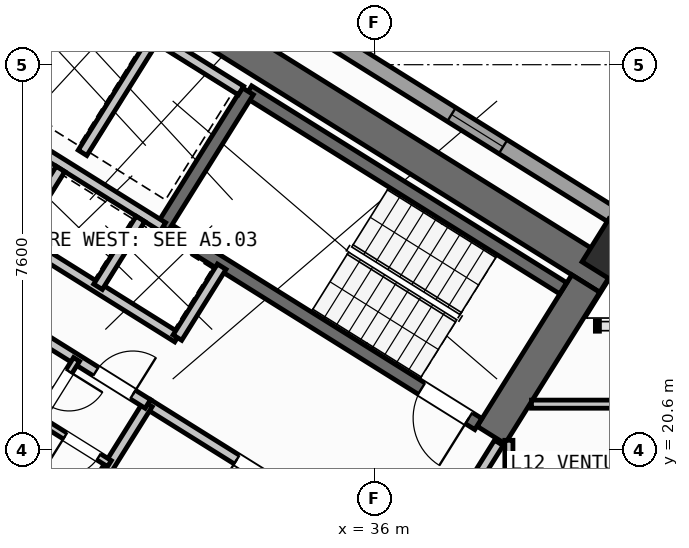
"""IFC4 building model, lengths in metres.
Left out: names, types, materials, properties, quantities, classifications, styles, units other than length and angle.
Written with IfcOpenShell. Run it as: python <this file> out.ifc"""

import sys

from ifc_helpers import new_model, si_unit, direction, frame, frame_2d, origin, origin_2d, place, context, subcontext, project, spatial, rectangle, hollow_rectangle, extrude, source, transform, mapped, element, fill, save


model = new_model("IFC4")
c1 = context("Model", 3, precision=1e-05, world=origin(), true_north=direction((0.0, 1.0)))
c2 = subcontext(c1, "Body", "Model", "MODEL_VIEW")
j1 = project(units=[si_unit("LENGTHUNIT", "METRE"), si_unit("PLANEANGLEUNIT", "RADIAN")], contexts=[c1])
p1 = place(None, origin())
s1 = spatial("IfcSite", under=j1, at=p1, CompositionType="ELEMENT")
p2 = place(p1, origin())
s2 = spatial("IfcBuilding", under=s1, at=p2, CompositionType="ELEMENT")
p3 = place(p2, frame((0.0, 0.0, 49.2)))
s3 = spatial("IfcBuildingStorey", under=s2, at=p3, CompositionType="ELEMENT", Elevation=49.2)
p4 = place(p3, frame((40.615, 23.983, 0.0), z_axis=(0.0, 0.0, 1.0), x_axis=(-0.848045953968, 0.529922692436, 0.0)))
e1 = element("IfcWall", 1, at=p4, inside=s3, PredefinedType="SHEAR", context=c2, shape_type="SweptSolid", body=[
    extrude(rectangle(XDim=13.24, YDim=0.65, at=frame_2d((6.62, 0.0))), origin(), (0.0, 0.0, 1.0), 3.35),
])
for number, where, z_axis, x_axis in (
    (2, (40.168, 23.88, 0.0), (0.0, 0.0, 1.0), (-0.53, -0.848, 0.0)),
    (3, (29.491, 30.552, 0.0), (0.0, 0.0, 1.0), (-0.53, -0.848, 0.0)),
):
    element("IfcWall", number, at=place(p3, frame(where, z_axis=z_axis, x_axis=x_axis)), inside=s3, PredefinedType="SHEAR", context=c2, shape_type="SweptSolid", body=[
        extrude(rectangle(XDim=3.525, YDim=0.65, at=frame_2d((1.763, 0.0))), origin(), (0.0, 0.0, 1.0), 3.35),
    ])
m1 = source(origin(), c2, "Body", "SweptSolid", [
    extrude(hollow_rectangle(XDim=1.0, YDim=1.0, WallThickness=0.04, at=origin_2d()), origin(), (0.0, 0.0, 1.0), 3.6),
])
p5 = place(p3, frame((40.783, 24.469, 0.0), z_axis=(0.0, 0.0, 1.0), x_axis=(-0.848048096156, 0.529919264233, 0.0)))
e4 = element("IfcColumn", 4, at=p5, inside=s3, PredefinedType="COLUMN", context=c2, shape_type="MappedRepresentation", body=[
    mapped(m1, transform((0.0, 0.0, 0.0), scale=1.0)),
])
p6 = place(p3, frame((14.138, 41.825, 0.0), z_axis=(0.0, 0.0, 1.0), x_axis=(0.848046498049, -0.529921821731, 0.0)))
e5 = element("IfcWall", 5, at=p6, inside=s3, PredefinedType="STANDARD", context=c2, shape_type="SweptSolid", body=[
    extrude(rectangle(XDim=31.588, YDim=0.32, at=frame_2d((15.794, 0.0))), origin(), (0.0, 0.0, 1.0), 3.35),
])
p7 = place(p6, frame((3.159, 0.0, 0.0)))
e6 = element("IfcOpeningElement", 6, at=p7, cuts=e5, PredefinedType="OPENING", context=c2, shape_type="SweptSolid", body=[
    extrude(rectangle(XDim=1.05, YDim=2.15, at=frame_2d((0.525, 1.075))), frame((0.0, 0.17, 0.0), z_axis=(0.0, -1.0, 0.0), x_axis=(1.0, 0.0, 0.0)), (0.0, 0.0, 1.0), 0.34),
])
p8 = place(p6, frame((0.906, 0.0, 1.0)))
e7 = element("IfcOpeningElement", 7, at=p8, cuts=e5, PredefinedType="OPENING", context=c2, shape_type="SweptSolid", body=[
    extrude(rectangle(XDim=0.9, YDim=1.25, at=frame_2d((0.45, 0.625))), frame((0.0, 0.17, 0.0), z_axis=(0.0, -1.0, 0.0), x_axis=(1.0, 0.0, 0.0)), (0.0, 0.0, 1.0), 0.34),
])
p9 = place(p6, frame((9.537, 0.0, 0.85)))
e8 = element("IfcOpeningElement", 8, at=p9, cuts=e5, PredefinedType="OPENING", context=c2, shape_type="SweptSolid", body=[
    extrude(rectangle(XDim=1.8, YDim=1.5, at=frame_2d((0.9, 0.75))), frame((0.0, 0.17, 0.0), z_axis=(0.0, -1.0, 0.0), x_axis=(1.0, 0.0, 0.0)), (0.0, 0.0, 1.0), 0.34),
])
p10 = place(p6, frame((13.899, 0.0, 0.85)))
e9 = element("IfcOpeningElement", 9, at=p10, cuts=e5, PredefinedType="OPENING", context=c2, shape_type="SweptSolid", body=[
    extrude(rectangle(XDim=1.5, YDim=1.5, at=frame_2d((0.75, 0.75))), frame((0.0, 0.17, 0.0), z_axis=(0.0, -1.0, 0.0), x_axis=(1.0, 0.0, 0.0)), (0.0, 0.0, 1.0), 0.34),
])
p11 = place(p6, frame((22.019, 0.0, 0.95)))
e10 = element("IfcOpeningElement", 10, at=p11, cuts=e5, PredefinedType="OPENING", context=c2, shape_type="SweptSolid", body=[
    extrude(rectangle(XDim=1.2, YDim=1.4, at=frame_2d((0.6, 0.7))), frame((0.0, 0.17, 0.0), z_axis=(0.0, -1.0, 0.0), x_axis=(1.0, 0.0, 0.0)), (0.0, 0.0, 1.0), 0.34),
])
p12 = place(p6, frame((27.569, 0.0, 0.95)))
e11 = element("IfcOpeningElement", 11, at=p12, cuts=e5, PredefinedType="OPENING", context=c2, shape_type="SweptSolid", body=[
    extrude(rectangle(XDim=1.2, YDim=1.4, at=frame_2d((0.6, 0.7))), frame((0.0, 0.17, 0.0), z_axis=(0.0, -1.0, 0.0), x_axis=(1.0, 0.0, 0.0)), (0.0, 0.0, 1.0), 0.34),
])
p13 = place(p3, frame((31.28, 18.261, 0.0), z_axis=(0.0, 0.0, 1.0), x_axis=(-0.848051618787, 0.529913626805, 0.0)))
e12 = element("IfcWall", 12, at=p13, inside=s3, PredefinedType="SHEAR", context=c2, shape_type="SweptSolid", body=[
    extrude(rectangle(XDim=7.46, YDim=0.26, at=frame_2d((3.73, 0.0))), origin(), (0.0, 0.0, 1.0), 3.35),
])
p14 = place(p13, frame((0.36, 0.0, 0.0)))
e13 = element("IfcOpeningElement", 13, at=p14, cuts=e12, PredefinedType="OPENING", context=c2, shape_type="SweptSolid", body=[
    extrude(rectangle(XDim=0.86, YDim=2.05, at=frame_2d((0.43, 1.025))), frame((0.0, 0.14, 0.0), z_axis=(0.0, -1.0, 0.0), x_axis=(1.0, 0.0, 0.0)), (0.0, 0.0, 1.0), 0.28),
])
p15 = place(p3, frame((39.721, 23.788, 0.0), z_axis=(0.0, 0.0, 1.0), x_axis=(-0.848054434086, 0.529909121291, 0.0)))
e14 = element("IfcWall", 14, at=p15, inside=s3, PredefinedType="SHEAR", context=c2, shape_type="SweptSolid", body=[
    extrude(rectangle(XDim=7.33, YDim=0.26, at=frame_2d((3.665, 0.0))), origin(), (0.0, 0.0, 1.0), 3.35),
])
p16 = place(p3, frame((38.046, 21.108, 0.0), z_axis=(0.0, 0.0, 1.0), x_axis=(-0.848054434086, 0.529909121291, 0.0)))
e15 = element("IfcWall", 15, at=p16, inside=s3, PredefinedType="SHEAR", context=c2, shape_type="SweptSolid", body=[
    extrude(rectangle(XDim=7.33, YDim=0.26, at=frame_2d((3.665, 0.0))), origin(), (0.0, 0.0, 1.0), 3.35),
])
p17 = place(p16, frame((0.22, 0.0, 0.0)))
e16 = element("IfcOpeningElement", 16, at=p17, cuts=e15, PredefinedType="OPENING", context=c2, shape_type="SweptSolid", body=[
    extrude(rectangle(XDim=1.1, YDim=2.1, at=frame_2d((0.55, 1.05))), frame((0.0, 0.14, 0.0), z_axis=(0.0, -1.0, 0.0), x_axis=(1.0, 0.0, 0.0)), (0.0, 0.0, 1.0), 0.28),
])
p18 = place(p3, frame((33.496, 27.677, 0.0), z_axis=(0.0, 0.0, 1.0), x_axis=(-0.529908658664, -0.84805472316, 0.0)))
e17 = element("IfcWall", 17, at=p18, inside=s3, PredefinedType="SHEAR", context=c2, shape_type="SweptSolid", body=[
    extrude(rectangle(XDim=3.16, YDim=0.26, at=frame_2d((1.58, 0.0))), origin(), (0.0, 0.0, 1.0), 3.35),
])
p19 = place(p3, frame((36.374, 18.474, 0.0), z_axis=(0.0, 0.0, 1.0), x_axis=(-0.848051071577, 0.529914502535, 0.0)))
e18 = element("IfcWall", 18, at=p19, inside=s3, PredefinedType="STANDARD", context=c2, shape_type="SweptSolid", body=[
    extrude(rectangle(XDim=5.718, YDim=0.2, at=frame_2d((2.859, 0.0))), origin(), (0.0, 0.0, 1.0), 3.34),
])
p20 = place(p19, frame((2.498, 0.0, 0.0)))
e19 = element("IfcOpeningElement", 19, at=p20, cuts=e18, PredefinedType="OPENING", context=c2, shape_type="SweptSolid", body=[
    extrude(rectangle(XDim=1.15, YDim=2.1, at=frame_2d((0.575, 1.05))), frame((0.0, 0.11, 0.0), z_axis=(0.0, -1.0, 0.0), x_axis=(1.0, 0.0, 0.0)), (0.0, 0.0, 1.0), 0.22),
])
p21 = place(p3, frame((31.822, 24.998, 0.0), z_axis=(0.0, 0.0, 1.0), x_axis=(-0.848058348634, 0.529902856485, 0.0)))
e20 = element("IfcWall", 20, at=p21, inside=s3, PredefinedType="STANDARD", context=c2, shape_type="SweptSolid", body=[
    extrude(rectangle(XDim=4.568, YDim=0.2, at=frame_2d((2.284, 0.0))), origin(), (0.0, 0.0, 1.0), 3.34),
])
p22 = place(p3, frame((32.108, 22.814, 0.0), z_axis=(0.0, 0.0, 1.0), x_axis=(-0.848042229521, 0.529928652696, 0.0)))
e21 = element("IfcWall", 21, at=p22, inside=s3, PredefinedType="STANDARD", context=c2, shape_type="SweptSolid", body=[
    extrude(rectangle(XDim=5.62, YDim=0.2, at=frame_2d((2.81, 0.0))), origin(), (0.0, 0.0, 1.0), 3.34),
])
p23 = place(p3, frame((32.982, 24.213, 0.0), z_axis=(0.0, 0.0, 1.0), x_axis=(-0.529839334948, -0.84809803628, 0.0)))
e22 = element("IfcWall", 22, at=p23, inside=s3, PredefinedType="STANDARD", context=c2, shape_type="SweptSolid", body=[
    extrude(rectangle(XDim=1.65, YDim=0.2, at=frame_2d((0.825, 0.0))), origin(), (0.0, 0.0, 1.0), 3.34),
])
p24 = place(p3, frame((31.645, 28.716, 0.0), z_axis=(0.0, 0.0, 1.0), x_axis=(-0.52986693015, -0.848080795876, 0.0)))
e23 = element("IfcWall", 23, at=p24, inside=s3, PredefinedType="STANDARD", context=c2, shape_type="SweptSolid", body=[
    extrude(rectangle(XDim=2.66, YDim=0.2, at=frame_2d((1.33, 0.0))), origin(), (0.0, 0.0, 1.0), 3.34),
])
p25 = place(p3, frame((33.363, 27.69, 0.0), z_axis=(0.0, 0.0, 1.0), x_axis=(-0.848053806312, 0.529910125964, 0.0)))
e24 = element("IfcWall", 24, at=p25, inside=s3, PredefinedType="STANDARD", context=c2, shape_type="SweptSolid", body=[
    extrude(rectangle(XDim=4.448, YDim=0.2, at=frame_2d((2.224, 0.0))), origin(), (0.0, 0.0, 1.0), 3.34),
])
for number, where, z_axis, x_axis in (
    (25, (31.379, 25.156, 0.0), (0.0, 0.0, 1.0), (-0.53, -0.848, 0.0)),
    (26, (29.801, 26.142, 0.0), (0.0, 0.0, 1.0), (-0.53, -0.848, 0.0)),
):
    element("IfcWall", number, at=place(p3, frame(where, z_axis=z_axis, x_axis=x_axis)), inside=s3, PredefinedType="STANDARD", context=c2, shape_type="SweptSolid", body=[
        extrude(rectangle(XDim=1.58, YDim=0.2, at=frame_2d((0.79, 0.0))), origin(), (0.0, 0.0, 1.0), 3.34),
    ])
p26 = place(p3, frame((31.525, 21.504, 0.0), z_axis=(0.0, 0.0, 1.0), x_axis=(-0.529907497854, -0.848055448493, 0.0)))
e27 = element("IfcWall", 27, at=p26, inside=s3, PredefinedType="STANDARD", context=c2, shape_type="SweptSolid", body=[
    extrude(rectangle(XDim=2.88, YDim=0.2, at=frame_2d((1.44, 0.0))), origin(), (0.0, 0.0, 1.0), 3.34),
])
p27 = place(p3, frame((31.525, 21.504, 0.0), z_axis=(0.0, 0.0, 1.0), x_axis=(-0.848044998614, 0.529924221305, 0.0)))
e28 = element("IfcWall", 28, at=p27, inside=s3, PredefinedType="STANDARD", context=c2, shape_type="SweptSolid", body=[
    extrude(rectangle(XDim=6.168, YDim=0.2, at=frame_2d((3.084, 0.0))), origin(), (0.0, 0.0, 1.0), 3.34),
])
p28 = place(p27, frame((4.4, 0.0, 0.0)))
e29 = element("IfcOpeningElement", 29, at=p28, cuts=e28, PredefinedType="OPENING", context=c2, shape_type="SweptSolid", body=[
    extrude(rectangle(XDim=0.86, YDim=2.05, at=frame_2d((0.43, 1.025))), frame((0.0, 0.11, 0.0), z_axis=(0.0, -1.0, 0.0), x_axis=(1.0, 0.0, 0.0)), (0.0, 0.0, 1.0), 0.22),
])
p29 = place(p27, frame((0.35, 0.0, 0.0)))
e30 = element("IfcOpeningElement", 30, at=p29, cuts=e28, PredefinedType="OPENING", context=c2, shape_type="SweptSolid", body=[
    extrude(rectangle(XDim=0.86, YDim=2.05, at=frame_2d((0.43, 1.025))), frame((0.0, 0.11, 0.0), z_axis=(0.0, -1.0, 0.0), x_axis=(1.0, 0.0, 0.0)), (0.0, 0.0, 1.0), 0.22),
])
p30 = place(p3, frame((30.117, 22.384, 0.0), z_axis=(0.0, 0.0, 1.0), x_axis=(-0.529951914384, -0.848027693204, 0.0)))
e31 = element("IfcWall", 31, at=p30, inside=s3, PredefinedType="PLUMBINGWALL", context=c2, shape_type="SweptSolid", body=[
    extrude(rectangle(XDim=1.4, YDim=0.14, at=frame_2d((0.7, 0.0))), origin(), (0.0, 0.0, 1.0), 3.34),
])
p31 = place(p30, frame((0.28, 0.0, 0.0)))
e32 = element("IfcOpeningElement", 32, at=p31, cuts=e31, PredefinedType="OPENING", context=c2, shape_type="SweptSolid", body=[
    extrude(rectangle(XDim=0.78, YDim=2.05, at=frame_2d((0.39, 1.025))), frame((0.0, 0.08, 0.0), z_axis=(0.0, -1.0, 0.0), x_axis=(1.0, 0.0, 0.0)), (0.0, 0.0, 1.0), 0.16),
])
p32 = place(p3, frame((30.766, 20.327, 0.0), z_axis=(0.0, 0.0, 1.0), x_axis=(-0.848052663127, 0.529911955482, 0.0)))
e33 = element("IfcWall", 33, at=p32, inside=s3, PredefinedType="PLUMBINGWALL", context=c2, shape_type="SweptSolid", body=[
    extrude(rectangle(XDim=3.28, YDim=0.14, at=frame_2d((1.64, 0.0))), origin(), (0.0, 0.0, 1.0), 3.34),
])
p33 = place(p32, frame((0.25, 0.0, 0.0)))
e34 = element("IfcOpeningElement", 34, at=p33, cuts=e33, PredefinedType="OPENING", context=c2, shape_type="SweptSolid", body=[
    extrude(rectangle(XDim=0.78, YDim=2.05, at=frame_2d((0.39, 1.025))), frame((0.0, 0.08, 0.0), z_axis=(0.0, -1.0, 0.0), x_axis=(1.0, 0.0, 0.0)), (0.0, 0.0, 1.0), 0.16),
])
p34 = place(p32, frame((1.92, 0.0, 0.0)))
e35 = element("IfcOpeningElement", 35, at=p34, cuts=e33, PredefinedType="OPENING", context=c2, shape_type="SweptSolid", body=[
    extrude(rectangle(XDim=0.78, YDim=2.05, at=frame_2d((0.39, 1.025))), frame((0.0, 0.08, 0.0), z_axis=(0.0, -1.0, 0.0), x_axis=(1.0, 0.0, 0.0)), (0.0, 0.0, 1.0), 0.16),
])
p35 = place(p3, frame((38.451, 20.737, 0.0), z_axis=(0.0, 0.0, 1.0), x_axis=(-0.529924799939, -0.848044637038, 0.0)))
e36 = element("IfcWall", 36, at=p35, inside=s3, PredefinedType="STANDARD", context=c2, shape_type="SweptSolid", body=[
    extrude(rectangle(XDim=2.96, YDim=0.2, at=frame_2d((1.48, 0.0))), origin(), (0.0, 0.0, 1.0), 3.34),
])
p36 = place(p35, frame((1.46, 0.0, 0.0)))
e37 = element("IfcOpeningElement", 37, at=p36, cuts=e36, PredefinedType="OPENING", context=c2, shape_type="SweptSolid", body=[
    extrude(rectangle(XDim=0.86, YDim=2.05, at=frame_2d((0.43, 1.025))), frame((0.0, 0.11, 0.0), z_axis=(0.0, -1.0, 0.0), x_axis=(1.0, 0.0, 0.0)), (0.0, 0.0, 1.0), 0.22),
])
p37 = place(p3, frame((38.65, 17.93, 0.0), z_axis=(0.0, 0.0, 1.0), x_axis=(0.0, 1.0, 0.0)))
e38 = element("IfcWall", 38, at=p37, inside=s3, PredefinedType="PARTITIONING", context=c2, shape_type="SweptSolid", body=[
    extrude(rectangle(XDim=2.857, YDim=0.16, at=frame_2d((1.428, 0.0))), origin(), (0.0, 0.0, 1.0), 3.34),
])
p38 = place(p3, frame((39.095, 21.5, 0.0), z_axis=(0.0, 0.0, 1.0), x_axis=(1.0, 0.0, 0.0)))
e39 = element("IfcWall", 39, at=p38, inside=s3, PredefinedType="PARTITIONING", context=c2, shape_type="SweptSolid", body=[
    extrude(rectangle(XDim=7.094, YDim=0.16, at=frame_2d((3.547, 0.0))), origin(), (0.0, 0.0, 1.0), 3.34),
])
m2 = source(origin(), c2, "Body", "SweptSolid", [
    extrude(rectangle(XDim=1.2, YDim=1.4, at=frame_2d((0.6, 0.7))), frame((0.0, 0.03, 0.0), z_axis=(0.0, -1.0, 0.0), x_axis=(1.0, 0.0, 0.0)), (0.0, 0.0, 1.0), 0.06),
])
p39 = place(p12, origin())
e40 = element("IfcWindow", 40, at=p39, inside=s3, PartitioningType="SINGLE_PANEL", PredefinedType="WINDOW", context=c2, shape_type="MappedRepresentation", body=[
    mapped(m2, transform((0.0, 0.0, 0.0), scale=1.0)),
])
fill(e11, e40)
m3 = source(origin(), c2, "Body", "SweptSolid", [
    extrude(rectangle(XDim=1.1, YDim=2.1, at=frame_2d((0.55, 1.05))), frame((0.0, 0.025, 0.0), z_axis=(0.0, -1.0, 0.0), x_axis=(1.0, 0.0, 0.0)), (0.0, 0.0, 1.0), 0.05),
])
p40 = place(p17, origin())
e41 = element("IfcDoor", 41, at=p40, inside=s3, OperationType="SINGLE_SWING_LEFT", PredefinedType="DOOR", context=c2, shape_type="MappedRepresentation", body=[
    mapped(m3, transform((0.0, 0.0, 0.0), scale=1.0)),
])
fill(e16, e41)
m4 = source(origin(), c2, "Body", "SweptSolid", [
    extrude(rectangle(XDim=1.15, YDim=2.1, at=frame_2d((0.575, 1.05))), frame((0.0, 0.025, 0.0), z_axis=(0.0, -1.0, 0.0), x_axis=(1.0, 0.0, 0.0)), (0.0, 0.0, 1.0), 0.05),
])
p41 = place(p20, origin())
e42 = element("IfcDoor", 42, at=p41, inside=s3, OperationType="SINGLE_SWING_RIGHT", PredefinedType="DOOR", context=c2, shape_type="MappedRepresentation", body=[
    mapped(m4, transform((0.0, 0.0, 0.0), scale=1.0)),
])
fill(e19, e42)
m5 = source(origin(), c2, "Body", "SweptSolid", [
    extrude(rectangle(XDim=0.86, YDim=2.05, at=frame_2d((0.43, 1.025))), frame((0.0, 0.025, 0.0), z_axis=(0.0, -1.0, 0.0), x_axis=(1.0, 0.0, 0.0)), (0.0, 0.0, 1.0), 0.05),
])
p42 = place(p29, frame((0.86, 0.0, 0.0), z_axis=(0.0, 0.0, 1.0), x_axis=(-1.0, 0.0, 0.0)))
e43 = element("IfcDoor", 43, at=p42, inside=s3, OperationType="SINGLE_SWING_RIGHT", PredefinedType="DOOR", context=c2, shape_type="MappedRepresentation", body=[
    mapped(m5, transform((0.0, 0.0, 0.0), scale=1.0)),
])
fill(e30, e43)
m6 = source(origin(), c2, "Body", "SweptSolid", [
    extrude(rectangle(XDim=0.78, YDim=2.05, at=frame_2d((0.39, 1.025))), frame((0.0, 0.025, 0.0), z_axis=(0.0, -1.0, 0.0), x_axis=(1.0, 0.0, 0.0)), (0.0, 0.0, 1.0), 0.05),
])
p43 = place(p31, origin())
e44 = element("IfcDoor", 44, at=p43, inside=s3, OperationType="SINGLE_SWING_LEFT", PredefinedType="DOOR", context=c2, shape_type="MappedRepresentation", body=[
    mapped(m6, transform((0.0, 0.0, 0.0), scale=1.0)),
])
fill(e32, e44)
p44 = place(p33, origin())
e45 = element("IfcDoor", 45, at=p44, inside=s3, OperationType="SINGLE_SWING_RIGHT", PredefinedType="DOOR", context=c2, shape_type="MappedRepresentation", body=[
    mapped(m6, transform((0.0, 0.0, 0.0), scale=1.0)),
])
fill(e34, e45)
save(model, sys.argv[1])
